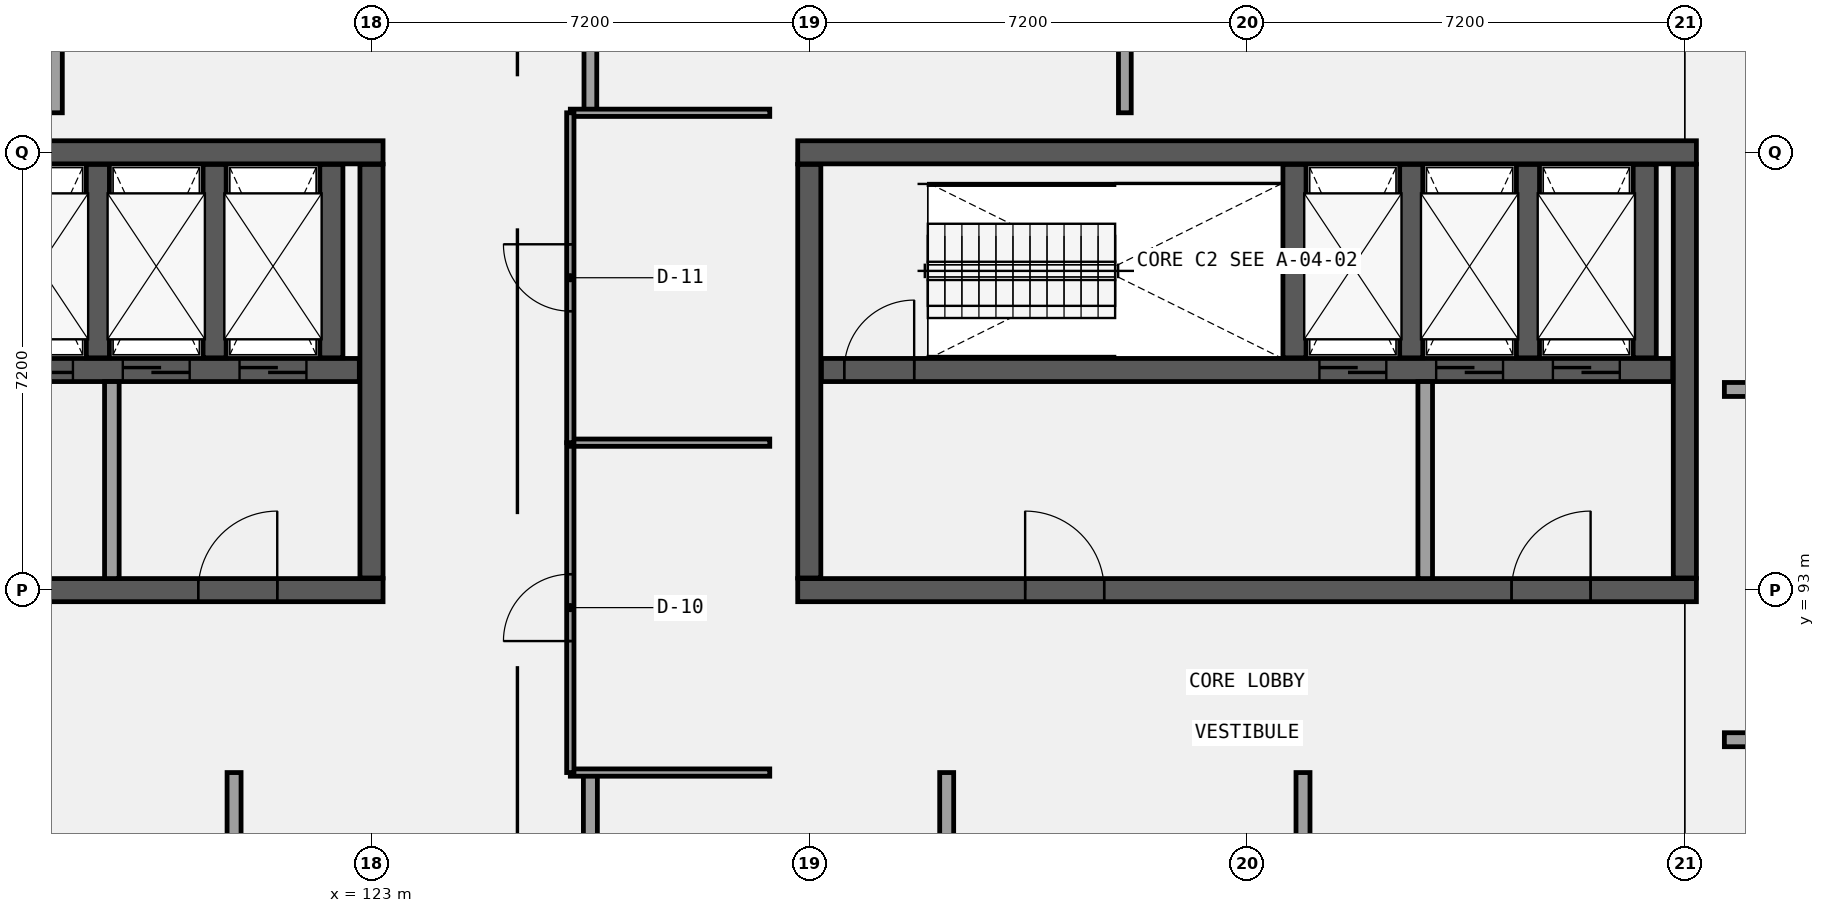
"""IFC4 building model, lengths in metres.
Left out: names, types, materials, properties, quantities, classifications, styles, units other than length and angle.
Written with IfcOpenShell. Run it as: python <this file> out.ifc"""

import sys

from ifc_helpers import new_model, si_unit, direction, frame, frame_2d, origin, place, context, subcontext, project, spatial, rectangle, extrude, element, fill, save


model = new_model("IFC4")
c1 = context("Model", 3, precision=1e-05, world=origin(), true_north=direction((0.0, 1.0)))
c2 = subcontext(c1, "Body", "Model", "MODEL_VIEW")
j1 = project(units=[si_unit("LENGTHUNIT", "METRE"), si_unit("PLANEANGLEUNIT", "RADIAN")], contexts=[c1])
p1 = place(None, origin())
s1 = spatial("IfcSite", under=j1, at=p1, CompositionType="ELEMENT")
p2 = place(p1, origin())
s2 = spatial("IfcBuilding", under=s1, at=p2, CompositionType="ELEMENT")
p3 = place(p2, frame((0.0, 0.0, 9.6)))
s3 = spatial("IfcBuildingStorey", under=s2, at=p3, CompositionType="ELEMENT", Elevation=9.6)
p4 = place(p3, frame((108.41, 100.2, 0.0), z_axis=(0.0, 0.0, 1.0), x_axis=(1.0, 0.0, 0.0)))
e1 = element("IfcWall", 1, at=p4, inside=s3, PredefinedType="SHEAR", context=c2, shape_type="SweptSolid", body=[
    extrude(rectangle(XDim=14.78, YDim=0.38, at=frame_2d((7.39, 0.0))), origin(), (0.0, 0.0, 1.0), 4.2),
])
p5 = place(p3, frame((108.41, 93.0, 0.0), z_axis=(0.0, 0.0, 1.0), x_axis=(1.0, 0.0, 0.0)))
e2 = element("IfcWall", 2, at=p5, inside=s3, PredefinedType="SHEAR", context=c2, shape_type="SweptSolid", body=[
    extrude(rectangle(XDim=14.78, YDim=0.38, at=frame_2d((7.39, 0.0))), origin(), (0.0, 0.0, 1.0), 4.2),
])
p6 = place(p5, frame((3.74, 0.0, 0.0)))
e3 = element("IfcOpeningElement", 3, at=p6, cuts=e2, PredefinedType="OPENING", context=c2, shape_type="SweptSolid", body=[
    extrude(rectangle(XDim=1.3, YDim=2.2, at=frame_2d((0.65, 1.1))), frame((0.0, 0.2, 0.0), z_axis=(0.0, -1.0, 0.0), x_axis=(1.0, 0.0, 0.0)), (0.0, 0.0, 1.0), 0.4),
])
p7 = place(p5, frame((11.74, 0.0, 0.0)))
e4 = element("IfcOpeningElement", 4, at=p7, cuts=e2, PredefinedType="OPENING", context=c2, shape_type="SweptSolid", body=[
    extrude(rectangle(XDim=1.3, YDim=2.2, at=frame_2d((0.65, 1.1))), frame((0.0, 0.2, 0.0), z_axis=(0.0, -1.0, 0.0), x_axis=(1.0, 0.0, 0.0)), (0.0, 0.0, 1.0), 0.4),
])
p8 = place(p3, frame((123.0, 93.2, 0.0), z_axis=(0.0, 0.0, 1.0), x_axis=(0.0, 1.0, 0.0)))
e5 = element("IfcWall", 5, at=p8, inside=s3, PredefinedType="SHEAR", context=c2, shape_type="SweptSolid", body=[
    extrude(rectangle(XDim=6.8, YDim=0.38, at=frame_2d((3.4, 0.0))), origin(), (0.0, 0.0, 1.0), 4.2),
])
p9 = place(p3, frame((108.8, 96.62, 0.0), z_axis=(0.0, 0.0, 1.0), x_axis=(1.0, 0.0, 0.0)))
e6 = element("IfcWall", 6, at=p9, inside=s3, PredefinedType="SHEAR", context=c2, shape_type="SweptSolid", body=[
    extrude(rectangle(XDim=14.0, YDim=0.38, at=frame_2d((7.0, 0.0))), origin(), (0.0, 0.0, 1.0), 4.2),
])
p10 = place(p9, frame((8.19, 0.0, 0.0)))
e7 = element("IfcOpeningElement", 7, at=p10, cuts=e6, PredefinedType="OPENING", context=c2, shape_type="SweptSolid", body=[
    extrude(rectangle(XDim=1.1, YDim=2.15, at=frame_2d((0.55, 1.075))), frame((0.0, 0.2, 0.0), z_axis=(0.0, -1.0, 0.0), x_axis=(1.0, 0.0, 0.0)), (0.0, 0.0, 1.0), 0.4),
])
p11 = place(p9, frame((10.11, 0.0, 0.0)))
e8 = element("IfcOpeningElement", 8, at=p11, cuts=e6, PredefinedType="OPENING", context=c2, shape_type="SweptSolid", body=[
    extrude(rectangle(XDim=1.1, YDim=2.15, at=frame_2d((0.55, 1.075))), frame((0.0, 0.2, 0.0), z_axis=(0.0, -1.0, 0.0), x_axis=(1.0, 0.0, 0.0)), (0.0, 0.0, 1.0), 0.4),
])
p12 = place(p9, frame((12.03, 0.0, 0.0)))
e9 = element("IfcOpeningElement", 9, at=p12, cuts=e6, PredefinedType="OPENING", context=c2, shape_type="SweptSolid", body=[
    extrude(rectangle(XDim=1.1, YDim=2.15, at=frame_2d((0.55, 1.075))), frame((0.0, 0.2, 0.0), z_axis=(0.0, -1.0, 0.0), x_axis=(1.0, 0.0, 0.0)), (0.0, 0.0, 1.0), 0.4),
])
p13 = place(p9, frame((0.375, 0.0, 0.0)))
e10 = element("IfcOpeningElement", 10, at=p13, cuts=e6, PredefinedType="OPENING", context=c2, shape_type="SweptSolid", body=[
    extrude(rectangle(XDim=1.15, YDim=2.15, at=frame_2d((0.575, 1.075))), frame((0.0, 0.2, 0.0), z_axis=(0.0, -1.0, 0.0), x_axis=(1.0, 0.0, 0.0)), (0.0, 0.0, 1.0), 0.4),
])
for number, where, z_axis, x_axis in (
    (11, (118.5, 96.82, 0.0), (0.0, 0.0, 1.0), (0.0, 1.0, 0.0)),
    (12, (120.42, 96.82, 0.0), (0.0, 0.0, 1.0), (0.0, 1.0, 0.0)),
    (13, (122.34, 96.82, 0.0), (0.0, 0.0, 1.0), (0.0, 1.0, 0.0)),
):
    element("IfcWall", number, at=place(p3, frame(where, z_axis=z_axis, x_axis=x_axis)), inside=s3, PredefinedType="SHEAR", context=c2, shape_type="SweptSolid", body=[
        extrude(rectangle(XDim=3.18, YDim=0.38, at=frame_2d((1.59, 0.0))), origin(), (0.0, 0.0, 1.0), 4.2),
    ])
p14 = place(p3, frame((130.01, 100.2, 0.0), z_axis=(0.0, 0.0, 1.0), x_axis=(1.0, 0.0, 0.0)))
e14 = element("IfcWall", 14, at=p14, inside=s3, PredefinedType="SHEAR", context=c2, shape_type="SweptSolid", body=[
    extrude(rectangle(XDim=14.78, YDim=0.38, at=frame_2d((7.39, 0.0))), origin(), (0.0, 0.0, 1.0), 4.2),
])
p15 = place(p3, frame((130.01, 93.0, 0.0), z_axis=(0.0, 0.0, 1.0), x_axis=(1.0, 0.0, 0.0)))
e15 = element("IfcWall", 15, at=p15, inside=s3, PredefinedType="SHEAR", context=c2, shape_type="SweptSolid", body=[
    extrude(rectangle(XDim=14.78, YDim=0.38, at=frame_2d((7.39, 0.0))), origin(), (0.0, 0.0, 1.0), 4.2),
])
p16 = place(p15, frame((3.74, 0.0, 0.0)))
e16 = element("IfcOpeningElement", 16, at=p16, cuts=e15, PredefinedType="OPENING", context=c2, shape_type="SweptSolid", body=[
    extrude(rectangle(XDim=1.3, YDim=2.2, at=frame_2d((0.65, 1.1))), frame((0.0, 0.2, 0.0), z_axis=(0.0, -1.0, 0.0), x_axis=(1.0, 0.0, 0.0)), (0.0, 0.0, 1.0), 0.4),
])
p17 = place(p15, frame((11.74, 0.0, 0.0)))
e17 = element("IfcOpeningElement", 17, at=p17, cuts=e15, PredefinedType="OPENING", context=c2, shape_type="SweptSolid", body=[
    extrude(rectangle(XDim=1.3, YDim=2.2, at=frame_2d((0.65, 1.1))), frame((0.0, 0.2, 0.0), z_axis=(0.0, -1.0, 0.0), x_axis=(1.0, 0.0, 0.0)), (0.0, 0.0, 1.0), 0.4),
])
for number, where, z_axis, x_axis in (
    (18, (130.2, 93.2, 0.0), (0.0, 0.0, 1.0), (0.0, 1.0, 0.0)),
    (19, (144.6, 93.2, 0.0), (0.0, 0.0, 1.0), (0.0, 1.0, 0.0)),
):
    element("IfcWall", number, at=place(p3, frame(where, z_axis=z_axis, x_axis=x_axis)), inside=s3, PredefinedType="SHEAR", context=c2, shape_type="SweptSolid", body=[
        extrude(rectangle(XDim=6.8, YDim=0.38, at=frame_2d((3.4, 0.0))), origin(), (0.0, 0.0, 1.0), 4.2),
    ])
p18 = place(p3, frame((130.4, 96.62, 0.0), z_axis=(0.0, 0.0, 1.0), x_axis=(1.0, 0.0, 0.0)))
e20 = element("IfcWall", 20, at=p18, inside=s3, PredefinedType="SHEAR", context=c2, shape_type="SweptSolid", body=[
    extrude(rectangle(XDim=14.0, YDim=0.38, at=frame_2d((7.0, 0.0))), origin(), (0.0, 0.0, 1.0), 4.2),
])
p19 = place(p18, frame((8.19, 0.0, 0.0)))
e21 = element("IfcOpeningElement", 21, at=p19, cuts=e20, PredefinedType="OPENING", context=c2, shape_type="SweptSolid", body=[
    extrude(rectangle(XDim=1.1, YDim=2.15, at=frame_2d((0.55, 1.075))), frame((0.0, 0.2, 0.0), z_axis=(0.0, -1.0, 0.0), x_axis=(1.0, 0.0, 0.0)), (0.0, 0.0, 1.0), 0.4),
])
p20 = place(p18, frame((10.11, 0.0, 0.0)))
e22 = element("IfcOpeningElement", 22, at=p20, cuts=e20, PredefinedType="OPENING", context=c2, shape_type="SweptSolid", body=[
    extrude(rectangle(XDim=1.1, YDim=2.15, at=frame_2d((0.55, 1.075))), frame((0.0, 0.2, 0.0), z_axis=(0.0, -1.0, 0.0), x_axis=(1.0, 0.0, 0.0)), (0.0, 0.0, 1.0), 0.4),
])
p21 = place(p18, frame((12.03, 0.0, 0.0)))
e23 = element("IfcOpeningElement", 23, at=p21, cuts=e20, PredefinedType="OPENING", context=c2, shape_type="SweptSolid", body=[
    extrude(rectangle(XDim=1.1, YDim=2.15, at=frame_2d((0.55, 1.075))), frame((0.0, 0.2, 0.0), z_axis=(0.0, -1.0, 0.0), x_axis=(1.0, 0.0, 0.0)), (0.0, 0.0, 1.0), 0.4),
])
p22 = place(p18, frame((0.375, 0.0, 0.0)))
e24 = element("IfcOpeningElement", 24, at=p22, cuts=e20, PredefinedType="OPENING", context=c2, shape_type="SweptSolid", body=[
    extrude(rectangle(XDim=1.15, YDim=2.15, at=frame_2d((0.575, 1.075))), frame((0.0, 0.2, 0.0), z_axis=(0.0, -1.0, 0.0), x_axis=(1.0, 0.0, 0.0)), (0.0, 0.0, 1.0), 0.4),
])
for number, where, z_axis, x_axis in (
    (25, (138.18, 96.82, 0.0), (0.0, 0.0, 1.0), (0.0, 1.0, 0.0)),
    (26, (140.1, 96.82, 0.0), (0.0, 0.0, 1.0), (0.0, 1.0, 0.0)),
    (27, (142.02, 96.82, 0.0), (0.0, 0.0, 1.0), (0.0, 1.0, 0.0)),
    (28, (143.94, 96.82, 0.0), (0.0, 0.0, 1.0), (0.0, 1.0, 0.0)),
):
    element("IfcWall", number, at=place(p3, frame(where, z_axis=z_axis, x_axis=x_axis)), inside=s3, PredefinedType="SHEAR", context=c2, shape_type="SweptSolid", body=[
        extrude(rectangle(XDim=3.18, YDim=0.38, at=frame_2d((1.59, 0.0))), origin(), (0.0, 0.0, 1.0), 4.2),
    ])
for number, where, z_axis, x_axis in (
    (29, (118.73, 93.19, 0.0), (0.0, 0.0, 1.0), (0.0, 1.0, 0.0)),
    (30, (140.33, 93.19, 0.0), (0.0, 0.0, 1.0), (0.0, 1.0, 0.0)),
):
    element("IfcWall", number, at=place(p3, frame(where, z_axis=z_axis, x_axis=x_axis)), inside=s3, PredefinedType="SOLIDWALL", context=c2, shape_type="SweptSolid", body=[
        extrude(rectangle(XDim=3.24, YDim=0.24, at=frame_2d((1.62, 0.0))), origin(), (0.0, 0.0, 1.0), 3.91),
    ])
for number, where, z_axis, x_axis in (
    (31, (117.81, 100.85, 0.0), (0.0, 0.0, 1.0), (0.0, 1.0, 0.0)),
    (32, (126.6, 100.85, 0.0), (0.0, 0.0, 1.0), (0.0, 1.0, 0.0)),
    (33, (135.39, 100.85, 0.0), (0.0, 0.0, 1.0), (0.0, 1.0, 0.0)),
):
    element("IfcWall", number, at=place(p3, frame(where, z_axis=z_axis, x_axis=x_axis)), inside=s3, PredefinedType="PARTITIONING", context=c2, shape_type="SweptSolid", body=[
        extrude(rectangle(XDim=7.29, YDim=0.21, at=frame_2d((3.645, 0.0))), origin(), (0.0, 0.0, 1.0), 3.94),
    ])
for number, where, z_axis, x_axis in (
    (34, (120.74, 81.64, 0.0), (0.0, 0.0, 1.0), (0.0, 1.0, 0.0)),
    (35, (126.6, 81.64, 0.0), (0.0, 0.0, 1.0), (0.0, 1.0, 0.0)),
    (36, (132.46, 81.64, 0.0), (0.0, 0.0, 1.0), (0.0, 1.0, 0.0)),
    (37, (138.32, 81.64, 0.0), (0.0, 0.0, 1.0), (0.0, 1.0, 0.0)),
):
    element("IfcWall", number, at=place(p3, frame(where, z_axis=z_axis, x_axis=x_axis)), inside=s3, PredefinedType="PARTITIONING", context=c2, shape_type="SweptSolid", body=[
        extrude(rectangle(XDim=8.36, YDim=0.23, at=frame_2d((4.18, 0.0))), origin(), (0.0, 0.0, 1.0), 3.94),
    ])
for number, where, z_axis, x_axis in (
    (38, (126.27, 90.0, 0.0), (0.0, 0.0, 1.0), (1.0, 0.0, 0.0)),
    (39, (126.27, 100.85, 0.0), (0.0, 0.0, 1.0), (1.0, 0.0, 0.0)),
):
    element("IfcWall", number, at=place(p3, frame(where, z_axis=z_axis, x_axis=x_axis)), inside=s3, PredefinedType="PARTITIONING", context=c2, shape_type="SweptSolid", body=[
        extrude(rectangle(XDim=3.28, YDim=0.12, at=frame_2d((1.64, 0.0))), origin(), (0.0, 0.0, 1.0), 3.94),
    ])
p23 = place(p3, frame((126.27, 90.0, 0.0), z_axis=(0.0, 0.0, 1.0), x_axis=(0.0, 1.0, 0.0)))
e40 = element("IfcWall", 40, at=p23, inside=s3, PredefinedType="PARTITIONING", context=c2, shape_type="SweptSolid", body=[
    extrude(rectangle(XDim=5.425, YDim=0.12, at=frame_2d((2.712, 0.0))), origin(), (0.0, 0.0, 1.0), 3.94),
])
p24 = place(p23, frame((2.163, 0.0, 0.0)))
e41 = element("IfcOpeningElement", 41, at=p24, cuts=e40, PredefinedType="OPENING", context=c2, shape_type="SweptSolid", body=[
    extrude(rectangle(XDim=1.1, YDim=2.1, at=frame_2d((0.55, 1.05))), frame((0.0, 0.07, 0.0), z_axis=(0.0, -1.0, 0.0), x_axis=(1.0, 0.0, 0.0)), (0.0, 0.0, 1.0), 0.14),
])
p25 = place(p3, frame((126.27, 95.425, 0.0), z_axis=(0.0, 0.0, 1.0), x_axis=(1.0, 0.0, 0.0)))
e42 = element("IfcWall", 42, at=p25, inside=s3, PredefinedType="PARTITIONING", context=c2, shape_type="SweptSolid", body=[
    extrude(rectangle(XDim=3.28, YDim=0.12, at=frame_2d((1.64, 0.0))), origin(), (0.0, 0.0, 1.0), 3.94),
])
p26 = place(p3, frame((126.27, 95.425, 0.0), z_axis=(0.0, 0.0, 1.0), x_axis=(0.0, 1.0, 0.0)))
e43 = element("IfcWall", 43, at=p26, inside=s3, PredefinedType="PARTITIONING", context=c2, shape_type="SweptSolid", body=[
    extrude(rectangle(XDim=5.425, YDim=0.12, at=frame_2d((2.712, 0.0))), origin(), (0.0, 0.0, 1.0), 3.94),
])
p27 = place(p26, frame((2.163, 0.0, 0.0)))
e44 = element("IfcOpeningElement", 44, at=p27, cuts=e43, PredefinedType="OPENING", context=c2, shape_type="SweptSolid", body=[
    extrude(rectangle(XDim=1.1, YDim=2.22, at=frame_2d((0.55, 1.11))), frame((0.0, 0.07, 0.0), z_axis=(0.0, -1.0, 0.0), x_axis=(1.0, 0.0, 0.0)), (0.0, 0.0, 1.0), 0.14),
])
p28 = place(p3, frame((145.25, 90.54, 0.0), z_axis=(0.0, 0.0, 1.0), x_axis=(1.0, 0.0, 0.0)))
e45 = element("IfcWall", 45, at=p28, inside=s3, PredefinedType="PARTITIONING", context=c2, shape_type="SweptSolid", body=[
    extrude(rectangle(XDim=8.245, YDim=0.23, at=frame_2d((4.123, 0.0))), origin(), (0.0, 0.0, 1.0), 3.94),
])
p29 = place(p3, frame((145.25, 96.3, 0.0), z_axis=(0.0, 0.0, 1.0), x_axis=(1.0, 0.0, 0.0)))
e46 = element("IfcWall", 46, at=p29, inside=s3, PredefinedType="PARTITIONING", context=c2, shape_type="SweptSolid", body=[
    extrude(rectangle(XDim=8.245, YDim=0.23, at=frame_2d((4.123, 0.0))), origin(), (0.0, 0.0, 1.0), 3.39),
])
p30 = place(p10, frame((1.1, 0.0, 0.0), z_axis=(0.0, 0.0, 1.0), x_axis=(-1.0, 0.0, 0.0)))
e47 = element("IfcDoor", 47, at=p30, inside=s3, OperationType="DOUBLE_DOOR_SLIDING", PredefinedType="DOOR", context=c2, shape_type="SweptSolid", body=[
    extrude(rectangle(XDim=1.1, YDim=2.15, at=frame_2d((0.55, 1.075))), frame((0.0, 0.025, 0.0), z_axis=(0.0, -1.0, 0.0), x_axis=(1.0, 0.0, 0.0)), (0.0, 0.0, 1.0), 0.05),
])
fill(e7, e47)
p31 = place(p11, frame((1.1, 0.0, 0.0), z_axis=(0.0, 0.0, 1.0), x_axis=(-1.0, 0.0, 0.0)))
e48 = element("IfcDoor", 48, at=p31, inside=s3, OperationType="DOUBLE_DOOR_SLIDING", PredefinedType="DOOR", context=c2, shape_type="SweptSolid", body=[
    extrude(rectangle(XDim=1.1, YDim=2.15, at=frame_2d((0.55, 1.075))), frame((0.0, 0.025, 0.0), z_axis=(0.0, -1.0, 0.0), x_axis=(1.0, 0.0, 0.0)), (0.0, 0.0, 1.0), 0.05),
])
fill(e8, e48)
p32 = place(p12, frame((1.1, 0.0, 0.0), z_axis=(0.0, 0.0, 1.0), x_axis=(-1.0, 0.0, 0.0)))
e49 = element("IfcDoor", 49, at=p32, inside=s3, OperationType="DOUBLE_DOOR_SLIDING", PredefinedType="DOOR", context=c2, shape_type="SweptSolid", body=[
    extrude(rectangle(XDim=1.1, YDim=2.15, at=frame_2d((0.55, 1.075))), frame((0.0, 0.025, 0.0), z_axis=(0.0, -1.0, 0.0), x_axis=(1.0, 0.0, 0.0)), (0.0, 0.0, 1.0), 0.05),
])
fill(e9, e49)
p33 = place(p7, frame((1.3, 0.0, 0.0), z_axis=(0.0, 0.0, 1.0), x_axis=(-1.0, 0.0, 0.0)))
e50 = element("IfcDoor", 50, at=p33, inside=s3, OperationType="SINGLE_SWING_RIGHT", PredefinedType="DOOR", context=c2, shape_type="SweptSolid", body=[
    extrude(rectangle(XDim=1.3, YDim=2.2, at=frame_2d((0.65, 1.1))), frame((0.0, 0.025, 0.0), z_axis=(0.0, -1.0, 0.0), x_axis=(1.0, 0.0, 0.0)), (0.0, 0.0, 1.0), 0.05),
])
fill(e4, e50)
p34 = place(p19, frame((1.1, 0.0, 0.0), z_axis=(0.0, 0.0, 1.0), x_axis=(-1.0, 0.0, 0.0)))
e51 = element("IfcDoor", 51, at=p34, inside=s3, OperationType="DOUBLE_DOOR_SLIDING", PredefinedType="DOOR", context=c2, shape_type="SweptSolid", body=[
    extrude(rectangle(XDim=1.1, YDim=2.15, at=frame_2d((0.55, 1.075))), frame((0.0, 0.025, 0.0), z_axis=(0.0, -1.0, 0.0), x_axis=(1.0, 0.0, 0.0)), (0.0, 0.0, 1.0), 0.05),
])
fill(e21, e51)
p35 = place(p20, frame((1.1, 0.0, 0.0), z_axis=(0.0, 0.0, 1.0), x_axis=(-1.0, 0.0, 0.0)))
e52 = element("IfcDoor", 52, at=p35, inside=s3, OperationType="DOUBLE_DOOR_SLIDING", PredefinedType="DOOR", context=c2, shape_type="SweptSolid", body=[
    extrude(rectangle(XDim=1.1, YDim=2.15, at=frame_2d((0.55, 1.075))), frame((0.0, 0.025, 0.0), z_axis=(0.0, -1.0, 0.0), x_axis=(1.0, 0.0, 0.0)), (0.0, 0.0, 1.0), 0.05),
])
fill(e22, e52)
p36 = place(p21, frame((1.1, 0.0, 0.0), z_axis=(0.0, 0.0, 1.0), x_axis=(-1.0, 0.0, 0.0)))
e53 = element("IfcDoor", 53, at=p36, inside=s3, OperationType="DOUBLE_DOOR_SLIDING", PredefinedType="DOOR", context=c2, shape_type="SweptSolid", body=[
    extrude(rectangle(XDim=1.1, YDim=2.15, at=frame_2d((0.55, 1.075))), frame((0.0, 0.025, 0.0), z_axis=(0.0, -1.0, 0.0), x_axis=(1.0, 0.0, 0.0)), (0.0, 0.0, 1.0), 0.05),
])
fill(e23, e53)
p37 = place(p22, origin())
e54 = element("IfcDoor", 54, at=p37, inside=s3, OperationType="SINGLE_SWING_RIGHT", PredefinedType="DOOR", context=c2, shape_type="SweptSolid", body=[
    extrude(rectangle(XDim=1.15, YDim=2.15, at=frame_2d((0.575, 1.075))), frame((0.0, 0.025, 0.0), z_axis=(0.0, -1.0, 0.0), x_axis=(1.0, 0.0, 0.0)), (0.0, 0.0, 1.0), 0.05),
])
fill(e24, e54)
p38 = place(p16, frame((1.3, 0.0, 0.0), z_axis=(0.0, 0.0, 1.0), x_axis=(-1.0, 0.0, 0.0)))
e55 = element("IfcDoor", 55, at=p38, inside=s3, OperationType="SINGLE_SWING_LEFT", PredefinedType="DOOR", context=c2, shape_type="SweptSolid", body=[
    extrude(rectangle(XDim=1.3, YDim=2.2, at=frame_2d((0.65, 1.1))), frame((0.0, 0.025, 0.0), z_axis=(0.0, -1.0, 0.0), x_axis=(1.0, 0.0, 0.0)), (0.0, 0.0, 1.0), 0.05),
])
fill(e16, e55)
p39 = place(p17, frame((1.3, 0.0, 0.0), z_axis=(0.0, 0.0, 1.0), x_axis=(-1.0, 0.0, 0.0)))
e56 = element("IfcDoor", 56, at=p39, inside=s3, OperationType="SINGLE_SWING_RIGHT", PredefinedType="DOOR", context=c2, shape_type="SweptSolid", body=[
    extrude(rectangle(XDim=1.3, YDim=2.2, at=frame_2d((0.65, 1.1))), frame((0.0, 0.025, 0.0), z_axis=(0.0, -1.0, 0.0), x_axis=(1.0, 0.0, 0.0)), (0.0, 0.0, 1.0), 0.05),
])
fill(e17, e56)
p40 = place(p24, origin())
e57 = element("IfcDoor", 57, at=p40, inside=s3, OperationType="SINGLE_SWING_LEFT", PredefinedType="DOOR", context=c2, shape_type="SweptSolid", body=[
    extrude(rectangle(XDim=1.1, YDim=2.1, at=frame_2d((0.55, 1.05))), frame((0.0, 0.025, 0.0), z_axis=(0.0, -1.0, 0.0), x_axis=(1.0, 0.0, 0.0)), (0.0, 0.0, 1.0), 0.05),
])
fill(e41, e57)
p41 = place(p27, origin())
e58 = element("IfcDoor", 58, at=p41, inside=s3, OperationType="SINGLE_SWING_RIGHT", PredefinedType="DOOR", context=c2, shape_type="SweptSolid", body=[
    extrude(rectangle(XDim=1.1, YDim=2.22, at=frame_2d((0.55, 1.11))), frame((0.0, 0.025, 0.0), z_axis=(0.0, -1.0, 0.0), x_axis=(1.0, 0.0, 0.0)), (0.0, 0.0, 1.0), 0.05),
])
fill(e44, e58)
save(model, sys.argv[1])
